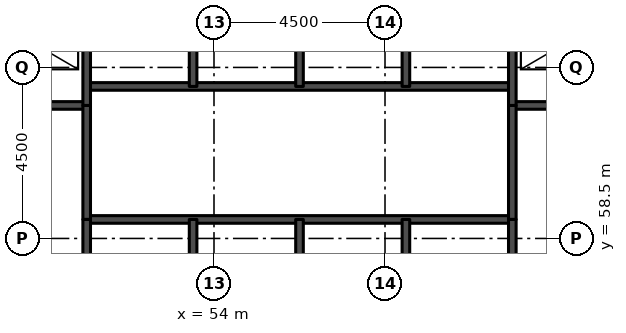
"""IFC4 building model, lengths in metres.
Left out: names, types, materials, properties, quantities, classifications, styles, units other than length and angle.
Written with IfcOpenShell. Run it as: python <this file> out.ifc"""

import sys

from ifc_helpers import new_model, si_unit, direction, frame, frame_2d, origin, place, context, subcontext, project, spatial, rectangle, extrude, element, save


model = new_model("IFC4")
c1 = context("Model", 3, precision=1e-05, world=origin(), true_north=direction((0.0, 1.0)))
c2 = subcontext(c1, "Body", "Model", "MODEL_VIEW")
j1 = project(units=[si_unit("LENGTHUNIT", "METRE"), si_unit("PLANEANGLEUNIT", "RADIAN")], contexts=[c1])
p1 = place(None, origin())
s1 = spatial("IfcSite", under=j1, at=p1, CompositionType="ELEMENT")
p2 = place(p1, origin())
s2 = spatial("IfcBuilding", under=s1, at=p2, CompositionType="ELEMENT")
p3 = place(p2, frame((0.0, 0.0, 56.1)))
s3 = spatial("IfcBuildingStorey", under=s2, at=p3, CompositionType="ELEMENT", Elevation=56.1)
p4 = place(p3, frame((50.65, 59.0, 0.0), z_axis=(0.0, 0.0, 1.0), x_axis=(1.0, 0.0, 0.0)))
e1 = element("IfcWall", 1, at=p4, inside=s3, PredefinedType="SOLIDWALL", context=c2, shape_type="SweptSolid", body=[
    extrude(rectangle(XDim=11.2, YDim=0.2, at=frame_2d((5.6, 0.0))), origin(), (0.0, 0.0, 1.0), 3.3),
])
for number, where, z_axis, x_axis in (
    (2, (45.5, 62.0, 0.0), (0.0, 0.0, 1.0), (1.0, 0.0, 0.0)),
    (3, (61.85, 62.0, 0.0), (0.0, 0.0, 1.0), (1.0, 0.0, 0.0)),
):
    element("IfcWall", number, at=place(p3, frame(where, z_axis=z_axis, x_axis=x_axis)), inside=s3, PredefinedType="SOLIDWALL", context=c2, shape_type="SweptSolid", body=[
        extrude(rectangle(XDim=5.15, YDim=0.2, at=frame_2d((2.575, 0.0))), origin(), (0.0, 0.0, 1.0), 3.08),
    ])
p5 = place(p3, frame((50.65, 62.5, 0.0), z_axis=(0.0, 0.0, 1.0), x_axis=(1.0, 0.0, 0.0)))
e4 = element("IfcWall", 4, at=p5, inside=s3, PredefinedType="SOLIDWALL", context=c2, shape_type="SweptSolid", body=[
    extrude(rectangle(XDim=11.2, YDim=0.2, at=frame_2d((5.6, 0.0))), origin(), (0.0, 0.0, 1.0), 3.3),
])
p6 = place(p3, frame((50.65, 59.0, 0.0), z_axis=(0.0, 0.0, 1.0), x_axis=(0.0, 1.0, 0.0)))
e5 = element("IfcWall", 5, at=p6, inside=s3, PredefinedType="SOLIDWALL", context=c2, shape_type="SweptSolid", body=[
    extrude(rectangle(XDim=3.0, YDim=0.2, at=frame_2d((1.5, 0.0))), origin(), (0.0, 0.0, 1.0), 3.3),
])
p7 = place(p3, frame((50.65, 56.2, 0.0), z_axis=(0.0, 0.0, 1.0), x_axis=(0.0, 1.0, 0.0)))
e6 = element("IfcWall", 6, at=p7, inside=s3, PredefinedType="SOLIDWALL", context=c2, shape_type="SweptSolid", body=[
    extrude(rectangle(XDim=2.8, YDim=0.2, at=frame_2d((1.4, 0.0))), origin(), (0.0, 0.0, 1.0), 3.08),
])
p8 = place(p3, frame((50.65, 62.0, 0.0), z_axis=(0.0, 0.0, 1.0), x_axis=(0.0, 1.0, 0.0)))
e7 = element("IfcWall", 7, at=p8, inside=s3, PredefinedType="SOLIDWALL", context=c2, shape_type="SweptSolid", body=[
    extrude(rectangle(XDim=3.3, YDim=0.2, at=frame_2d((1.65, 0.0))), origin(), (0.0, 0.0, 1.0), 3.08),
])
for number, where, z_axis, x_axis in (
    (8, (53.45, 56.2, 0.0), (0.0, 0.0, 1.0), (0.0, 1.0, 0.0)),
    (9, (53.45, 62.5, 0.0), (0.0, 0.0, 1.0), (0.0, 1.0, 0.0)),
    (10, (56.25, 56.2, 0.0), (0.0, 0.0, 1.0), (0.0, 1.0, 0.0)),
    (11, (56.25, 62.5, 0.0), (0.0, 0.0, 1.0), (0.0, 1.0, 0.0)),
    (12, (59.05, 56.2, 0.0), (0.0, 0.0, 1.0), (0.0, 1.0, 0.0)),
    (13, (59.05, 62.5, 0.0), (0.0, 0.0, 1.0), (0.0, 1.0, 0.0)),
):
    element("IfcWall", number, at=place(p3, frame(where, z_axis=z_axis, x_axis=x_axis)), inside=s3, PredefinedType="SOLIDWALL", context=c2, shape_type="SweptSolid", body=[
        extrude(rectangle(XDim=2.8, YDim=0.2, at=frame_2d((1.4, 0.0))), origin(), (0.0, 0.0, 1.0), 3.08),
    ])
p9 = place(p3, frame((61.85, 59.0, 0.0), z_axis=(0.0, 0.0, 1.0), x_axis=(0.0, 1.0, 0.0)))
e14 = element("IfcWall", 14, at=p9, inside=s3, PredefinedType="SOLIDWALL", context=c2, shape_type="SweptSolid", body=[
    extrude(rectangle(XDim=3.0, YDim=0.2, at=frame_2d((1.5, 0.0))), origin(), (0.0, 0.0, 1.0), 3.3),
])
p10 = place(p3, frame((61.85, 56.2, 0.0), z_axis=(0.0, 0.0, 1.0), x_axis=(0.0, 1.0, 0.0)))
e15 = element("IfcWall", 15, at=p10, inside=s3, PredefinedType="SOLIDWALL", context=c2, shape_type="SweptSolid", body=[
    extrude(rectangle(XDim=2.8, YDim=0.2, at=frame_2d((1.4, 0.0))), origin(), (0.0, 0.0, 1.0), 3.08),
])
p11 = place(p3, frame((61.85, 62.0, 0.0), z_axis=(0.0, 0.0, 1.0), x_axis=(0.0, 1.0, 0.0)))
e16 = element("IfcWall", 16, at=p11, inside=s3, PredefinedType="SOLIDWALL", context=c2, shape_type="SweptSolid", body=[
    extrude(rectangle(XDim=3.3, YDim=0.2, at=frame_2d((1.65, 0.0))), origin(), (0.0, 0.0, 1.0), 3.08),
])
save(model, sys.argv[1])
